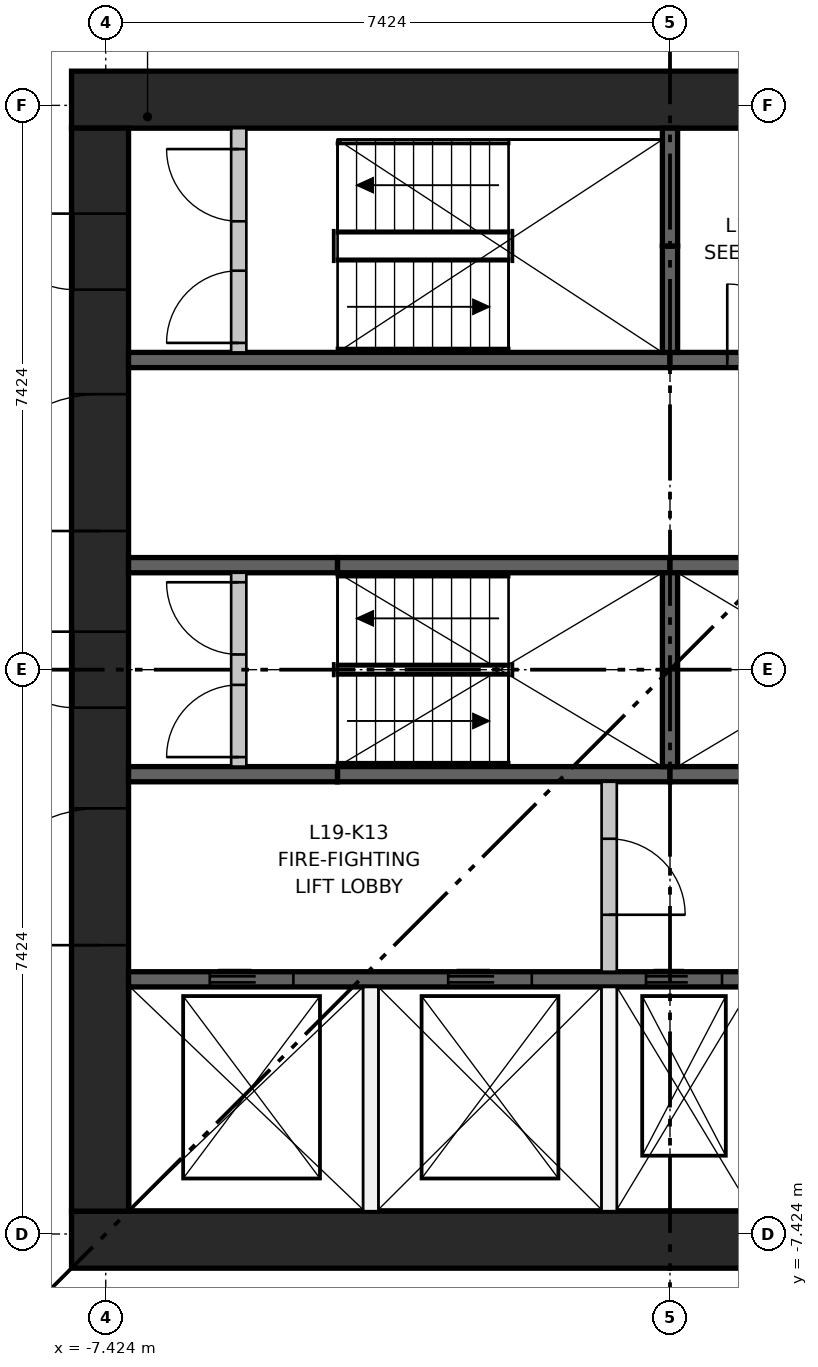
"""IFC4 building model, lengths in metres.
Left out: names, types, materials, properties, quantities, classifications, styles, units other than length and angle.
Written with IfcOpenShell. Run it as: python <this file> out.ifc"""

import sys

from ifc_helpers import new_model, si_unit, direction, frame, frame_2d, origin, place, context, subcontext, project, spatial, rectangle, extrude, element, fill, save


model = new_model("IFC4")
c1 = context("Model", 3, precision=1e-05, world=origin(), true_north=direction((0.0, 1.0)))
c2 = subcontext(c1, "Body", "Model", "MODEL_VIEW")
j1 = project(units=[si_unit("LENGTHUNIT", "METRE"), si_unit("PLANEANGLEUNIT", "RADIAN")], contexts=[c1])
p1 = place(None, origin())
s1 = spatial("IfcSite", under=j1, at=p1, CompositionType="ELEMENT")
p2 = place(p1, origin())
s2 = spatial("IfcBuilding", under=s1, at=p2, CompositionType="ELEMENT")
p3 = place(p2, frame((0.0, 0.0, 76.4)))
s3 = spatial("IfcBuildingStorey", under=s2, at=p3, CompositionType="ELEMENT", Elevation=76.4)
for number, where, z_axis, x_axis in (
    (1, (-7.874, -7.499, 0.0), (0.0, 0.0, 1.0), (1.0, 0.0, 0.0)),
    (2, (-7.874, 7.499, 0.0), (0.0, 0.0, 1.0), (1.0, 0.0, 0.0)),
):
    element("IfcWall", number, at=place(p3, frame(where, z_axis=z_axis, x_axis=x_axis)), inside=s3, PredefinedType="SHEAR", context=c2, shape_type="SweptSolid", body=[
        extrude(rectangle(XDim=15.748, YDim=0.75, at=frame_2d((7.874, 0.0))), origin(), (0.0, 0.0, 1.0), 3.65),
    ])
p4 = place(p3, frame((-7.499, -7.124, 0.0), z_axis=(0.0, 0.0, 1.0), x_axis=(0.0, 1.0, 0.0)))
e3 = element("IfcWall", 3, at=p4, inside=s3, PredefinedType="SHEAR", context=c2, shape_type="SweptSolid", body=[
    extrude(rectangle(XDim=14.248, YDim=0.75, at=frame_2d((7.124, 0.0))), origin(), (0.0, 0.0, 1.0), 3.65),
])
p5 = place(p4, frame((6.624, 0.0, 0.0)))
e4 = element("IfcOpeningElement", 4, at=p5, cuts=e3, PredefinedType="OPENING", context=c2, shape_type="SweptSolid", body=[
    extrude(rectangle(XDim=1.0, YDim=2.1, at=frame_2d((0.5, 1.05))), frame((0.0, 0.385, 0.0), z_axis=(0.0, -1.0, 0.0), x_axis=(1.0, 0.0, 0.0)), (0.0, 0.0, 1.0), 0.77),
])
p6 = place(p4, frame((3.5, 0.0, 0.0)))
e5 = element("IfcOpeningElement", 5, at=p6, cuts=e3, PredefinedType="OPENING", context=c2, shape_type="SweptSolid", body=[
    extrude(rectangle(XDim=1.8, YDim=2.1, at=frame_2d((0.9, 1.05))), frame((0.0, 0.385, 0.0), z_axis=(0.0, -1.0, 0.0), x_axis=(1.0, 0.0, 0.0)), (0.0, 0.0, 1.0), 0.77),
])
p7 = place(p4, frame((8.948, 0.0, 0.0)))
e6 = element("IfcOpeningElement", 6, at=p7, cuts=e3, PredefinedType="OPENING", context=c2, shape_type="SweptSolid", body=[
    extrude(rectangle(XDim=1.8, YDim=2.1, at=frame_2d((0.9, 1.05))), frame((0.0, 0.385, 0.0), z_axis=(0.0, -1.0, 0.0), x_axis=(1.0, 0.0, 0.0)), (0.0, 0.0, 1.0), 0.77),
])
p8 = place(p4, frame((12.124, 0.0, 0.0)))
e7 = element("IfcOpeningElement", 7, at=p8, cuts=e3, PredefinedType="OPENING", context=c2, shape_type="SweptSolid", body=[
    extrude(rectangle(XDim=1.0, YDim=2.1, at=frame_2d((0.5, 1.05))), frame((0.0, 0.385, 0.0), z_axis=(0.0, -1.0, 0.0), x_axis=(1.0, 0.0, 0.0)), (0.0, 0.0, 1.0), 0.77),
])
p9 = place(p3, frame((-7.124, -4.074, 0.0), z_axis=(0.0, 0.0, 1.0), x_axis=(1.0, 0.0, 0.0)))
e8 = element("IfcWall", 8, at=p9, inside=s3, PredefinedType="SHEAR", context=c2, shape_type="SweptSolid", body=[
    extrude(rectangle(XDim=14.248, YDim=0.2, at=frame_2d((7.124, 0.0))), origin(), (0.0, 0.0, 1.0), 3.3),
])
p10 = place(p9, frame((1.069, 0.0, 0.0)))
e9 = element("IfcOpeningElement", 9, at=p10, cuts=e8, PredefinedType="OPENING", context=c2, shape_type="SweptSolid", body=[
    extrude(rectangle(XDim=1.1, YDim=2.1, at=frame_2d((0.55, 1.05))), frame((0.0, 0.11, 0.0), z_axis=(0.0, -1.0, 0.0), x_axis=(1.0, 0.0, 0.0)), (0.0, 0.0, 1.0), 0.22),
])
p11 = place(p9, frame((4.206, 0.0, 0.0)))
e10 = element("IfcOpeningElement", 10, at=p11, cuts=e8, PredefinedType="OPENING", context=c2, shape_type="SweptSolid", body=[
    extrude(rectangle(XDim=1.1, YDim=2.1, at=frame_2d((0.55, 1.05))), frame((0.0, 0.11, 0.0), z_axis=(0.0, -1.0, 0.0), x_axis=(1.0, 0.0, 0.0)), (0.0, 0.0, 1.0), 0.22),
])
p12 = place(p9, frame((6.808, 0.0, 0.0)))
e11 = element("IfcOpeningElement", 11, at=p12, cuts=e8, PredefinedType="OPENING", context=c2, shape_type="SweptSolid", body=[
    extrude(rectangle(XDim=1.0, YDim=2.1, at=frame_2d((0.5, 1.05))), frame((0.0, 0.11, 0.0), z_axis=(0.0, -1.0, 0.0), x_axis=(1.0, 0.0, 0.0)), (0.0, 0.0, 1.0), 0.22),
])
p13 = place(p9, frame((8.777, 0.0, 0.0)))
e12 = element("IfcOpeningElement", 12, at=p13, cuts=e8, PredefinedType="OPENING", context=c2, shape_type="SweptSolid", body=[
    extrude(rectangle(XDim=1.0, YDim=2.1, at=frame_2d((0.5, 1.05))), frame((0.0, 0.11, 0.0), z_axis=(0.0, -1.0, 0.0), x_axis=(1.0, 0.0, 0.0)), (0.0, 0.0, 1.0), 0.22),
])
p14 = place(p9, frame((10.745, 0.0, 0.0)))
e13 = element("IfcOpeningElement", 13, at=p14, cuts=e8, PredefinedType="OPENING", context=c2, shape_type="SweptSolid", body=[
    extrude(rectangle(XDim=1.0, YDim=2.1, at=frame_2d((0.5, 1.05))), frame((0.0, 0.11, 0.0), z_axis=(0.0, -1.0, 0.0), x_axis=(1.0, 0.0, 0.0)), (0.0, 0.0, 1.0), 0.22),
])
p15 = place(p9, frame((12.714, 0.0, 0.0)))
e14 = element("IfcOpeningElement", 14, at=p15, cuts=e8, PredefinedType="OPENING", context=c2, shape_type="SweptSolid", body=[
    extrude(rectangle(XDim=1.0, YDim=2.1, at=frame_2d((0.5, 1.05))), frame((0.0, 0.11, 0.0), z_axis=(0.0, -1.0, 0.0), x_axis=(1.0, 0.0, 0.0)), (0.0, 0.0, 1.0), 0.22),
])
p16 = place(p3, frame((-7.124, 4.074, 0.0), z_axis=(0.0, 0.0, 1.0), x_axis=(1.0, 0.0, 0.0)))
e15 = element("IfcWall", 15, at=p16, inside=s3, PredefinedType="SHEAR", context=c2, shape_type="SweptSolid", body=[
    extrude(rectangle(XDim=7.124, YDim=0.2, at=frame_2d((3.562, 0.0))), origin(), (0.0, 0.0, 1.0), 3.3),
])
p17 = place(p3, frame((0.0, 4.074, 0.0), z_axis=(0.0, 0.0, 1.0), x_axis=(1.0, 0.0, 0.0)))
e16 = element("IfcWall", 16, at=p17, inside=s3, PredefinedType="SHEAR", context=c2, shape_type="SweptSolid", body=[
    extrude(rectangle(XDim=7.124, YDim=0.2, at=frame_2d((3.562, 0.0))), origin(), (0.0, 0.0, 1.0), 3.3),
])
p18 = place(p17, frame((0.753, 0.0, 0.0)))
e17 = element("IfcOpeningElement", 17, at=p18, cuts=e16, PredefinedType="OPENING", context=c2, shape_type="SweptSolid", body=[
    extrude(rectangle(XDim=1.0, YDim=2.1, at=frame_2d((0.5, 1.05))), frame((0.0, 0.11, 0.0), z_axis=(0.0, -1.0, 0.0), x_axis=(1.0, 0.0, 0.0)), (0.0, 0.0, 1.0), 0.22),
])
p19 = place(p17, frame((2.685, 0.0, 0.0)))
e18 = element("IfcOpeningElement", 18, at=p19, cuts=e16, PredefinedType="OPENING", context=c2, shape_type="SweptSolid", body=[
    extrude(rectangle(XDim=0.95, YDim=2.1, at=frame_2d((0.475, 1.05))), frame((0.0, 0.11, 0.0), z_axis=(0.0, -1.0, 0.0), x_axis=(1.0, 0.0, 0.0)), (0.0, 0.0, 1.0), 0.22),
])
p20 = place(p17, frame((4.06, 0.0, 0.0)))
e19 = element("IfcOpeningElement", 19, at=p20, cuts=e16, PredefinedType="OPENING", context=c2, shape_type="SweptSolid", body=[
    extrude(rectangle(XDim=1.0, YDim=2.1, at=frame_2d((0.5, 1.05))), frame((0.0, 0.11, 0.0), z_axis=(0.0, -1.0, 0.0), x_axis=(1.0, 0.0, 0.0)), (0.0, 0.0, 1.0), 0.22),
])
p21 = place(p17, frame((5.79, 0.0, 0.0)))
e20 = element("IfcOpeningElement", 20, at=p21, cuts=e16, PredefinedType="OPENING", context=c2, shape_type="SweptSolid", body=[
    extrude(rectangle(XDim=0.8, YDim=2.1, at=frame_2d((0.4, 1.05))), frame((0.0, 0.11, 0.0), z_axis=(0.0, -1.0, 0.0), x_axis=(1.0, 0.0, 0.0)), (0.0, 0.0, 1.0), 0.22),
])
p22 = place(p3, frame((-7.124, -1.375, 0.0), z_axis=(0.0, 0.0, 1.0), x_axis=(1.0, 0.0, 0.0)))
e21 = element("IfcWall", 21, at=p22, inside=s3, PredefinedType="SHEAR", context=c2, shape_type="SweptSolid", body=[
    extrude(rectangle(XDim=2.75, YDim=0.2, at=frame_2d((1.375, 0.0))), origin(), (0.0, 0.0, 1.0), 3.3),
])
for number, where, z_axis, x_axis in (
    (22, (-4.374, -1.375, 0.0), (0.0, 0.0, 1.0), (1.0, 0.0, 0.0)),
    (23, (0.0, -1.375, 0.0), (0.0, 0.0, 1.0), (1.0, 0.0, 0.0)),
):
    element("IfcWall", number, at=place(p3, frame(where, z_axis=z_axis, x_axis=x_axis)), inside=s3, PredefinedType="SHEAR", context=c2, shape_type="SweptSolid", body=[
        extrude(rectangle(XDim=4.374, YDim=0.2, at=frame_2d((2.187, 0.0))), origin(), (0.0, 0.0, 1.0), 3.3),
    ])
p23 = place(p3, frame((-7.124, 1.375, 0.0), z_axis=(0.0, 0.0, 1.0), x_axis=(1.0, 0.0, 0.0)))
e24 = element("IfcWall", 24, at=p23, inside=s3, PredefinedType="SHEAR", context=c2, shape_type="SweptSolid", body=[
    extrude(rectangle(XDim=2.75, YDim=0.2, at=frame_2d((1.375, 0.0))), origin(), (0.0, 0.0, 1.0), 3.3),
])
for number, where, z_axis, x_axis in (
    (25, (-4.374, 1.375, 0.0), (0.0, 0.0, 1.0), (1.0, 0.0, 0.0)),
    (26, (0.0, 1.375, 0.0), (0.0, 0.0, 1.0), (1.0, 0.0, 0.0)),
):
    element("IfcWall", number, at=place(p3, frame(where, z_axis=z_axis, x_axis=x_axis)), inside=s3, PredefinedType="SHEAR", context=c2, shape_type="SweptSolid", body=[
        extrude(rectangle(XDim=4.374, YDim=0.2, at=frame_2d((2.187, 0.0))), origin(), (0.0, 0.0, 1.0), 3.3),
    ])
p24 = place(p3, frame((0.0, -1.275, 0.0), z_axis=(0.0, 0.0, 1.0), x_axis=(0.0, 1.0, 0.0)))
e27 = element("IfcWall", 27, at=p24, inside=s3, PredefinedType="SHEAR", context=c2, shape_type="SweptSolid", body=[
    extrude(rectangle(XDim=2.55, YDim=0.2, at=frame_2d((1.275, 0.0))), origin(), (0.0, 0.0, 1.0), 3.3),
])
for number, where, z_axis, x_axis in (
    (28, (-3.937, -7.124, 0.0), (0.0, 0.0, 1.0), (0.0, 1.0, 0.0)),
    (29, (-0.8, -7.124, 0.0), (0.0, 0.0, 1.0), (0.0, 1.0, 0.0)),
):
    element("IfcWall", number, at=place(p3, frame(where, z_axis=z_axis, x_axis=x_axis)), inside=s3, PredefinedType="PARTITIONING", context=c2, shape_type="SweptSolid", body=[
        extrude(rectangle(XDim=2.95, YDim=0.2, at=frame_2d((1.475, 0.0))), origin(), (0.0, 0.0, 1.0), 3.3),
    ])
p25 = place(p3, frame((-0.8, -3.974, 0.0), z_axis=(0.0, 0.0, 1.0), x_axis=(0.0, 1.0, 0.0)))
e30 = element("IfcWall", 30, at=p25, inside=s3, PredefinedType="PARTITIONING", context=c2, shape_type="SweptSolid", body=[
    extrude(rectangle(XDim=2.499, YDim=0.2, at=frame_2d((1.25, 0.0))), origin(), (0.0, 0.0, 1.0), 3.3),
])
p26 = place(p25, frame((0.75, 0.0, 0.0)))
e31 = element("IfcOpeningElement", 31, at=p26, cuts=e30, PredefinedType="OPENING", context=c2, shape_type="SweptSolid", body=[
    extrude(rectangle(XDim=1.0, YDim=2.1, at=frame_2d((0.5, 1.05))), frame((0.0, 0.11, 0.0), z_axis=(0.0, -1.0, 0.0), x_axis=(1.0, 0.0, 0.0)), (0.0, 0.0, 1.0), 0.22),
])
p27 = place(p3, frame((0.0, 4.174, 0.0), z_axis=(0.0, 0.0, 1.0), x_axis=(0.0, 1.0, 0.0)))
e32 = element("IfcWall", 32, at=p27, inside=s3, PredefinedType="SHEAR", context=c2, shape_type="SweptSolid", body=[
    extrude(rectangle(XDim=1.4, YDim=0.2, at=frame_2d((0.7, 0.0))), origin(), (0.0, 0.0, 1.0), 3.3),
])
p28 = place(p3, frame((0.0, 5.574, 0.0), z_axis=(0.0, 0.0, 1.0), x_axis=(0.0, 1.0, 0.0)))
e33 = element("IfcWall", 33, at=p28, inside=s3, PredefinedType="SHEAR", context=c2, shape_type="SweptSolid", body=[
    extrude(rectangle(XDim=1.55, YDim=0.2, at=frame_2d((0.775, 0.0))), origin(), (0.0, 0.0, 1.0), 3.3),
])
p29 = place(p3, frame((-5.674, -1.275, 0.0), z_axis=(0.0, 0.0, 1.0), x_axis=(0.0, 1.0, 0.0)))
e34 = element("IfcWall", 34, at=p29, inside=s3, PredefinedType="PARTITIONING", context=c2, shape_type="SweptSolid", body=[
    extrude(rectangle(XDim=2.55, YDim=0.2, at=frame_2d((1.275, 0.0))), origin(), (0.0, 0.0, 1.0), 3.3),
])
p30 = place(p29, frame((0.125, 0.0, 0.0)))
e35 = element("IfcOpeningElement", 35, at=p30, cuts=e34, PredefinedType="OPENING", context=c2, shape_type="SweptSolid", body=[
    extrude(rectangle(XDim=0.95, YDim=2.1, at=frame_2d((0.475, 1.05))), frame((0.0, 0.11, 0.0), z_axis=(0.0, -1.0, 0.0), x_axis=(1.0, 0.0, 0.0)), (0.0, 0.0, 1.0), 0.22),
])
p31 = place(p29, frame((1.475, 0.0, 0.0)))
e36 = element("IfcOpeningElement", 36, at=p31, cuts=e34, PredefinedType="OPENING", context=c2, shape_type="SweptSolid", body=[
    extrude(rectangle(XDim=0.95, YDim=2.1, at=frame_2d((0.475, 1.05))), frame((0.0, 0.11, 0.0), z_axis=(0.0, -1.0, 0.0), x_axis=(1.0, 0.0, 0.0)), (0.0, 0.0, 1.0), 0.22),
])
p32 = place(p3, frame((-5.674, 4.174, 0.0), z_axis=(0.0, 0.0, 1.0), x_axis=(0.0, 1.0, 0.0)))
e37 = element("IfcWall", 37, at=p32, inside=s3, PredefinedType="PARTITIONING", context=c2, shape_type="SweptSolid", body=[
    extrude(rectangle(XDim=2.95, YDim=0.2, at=frame_2d((1.475, 0.0))), origin(), (0.0, 0.0, 1.0), 3.3),
])
p33 = place(p32, frame((0.125, 0.0, 0.0)))
e38 = element("IfcOpeningElement", 38, at=p33, cuts=e37, PredefinedType="OPENING", context=c2, shape_type="SweptSolid", body=[
    extrude(rectangle(XDim=0.95, YDim=2.1, at=frame_2d((0.475, 1.05))), frame((0.0, 0.11, 0.0), z_axis=(0.0, -1.0, 0.0), x_axis=(1.0, 0.0, 0.0)), (0.0, 0.0, 1.0), 0.22),
])
p34 = place(p32, frame((1.725, 0.0, 0.0)))
e39 = element("IfcOpeningElement", 39, at=p34, cuts=e37, PredefinedType="OPENING", context=c2, shape_type="SweptSolid", body=[
    extrude(rectangle(XDim=0.95, YDim=2.1, at=frame_2d((0.475, 1.05))), frame((0.0, 0.11, 0.0), z_axis=(0.0, -1.0, 0.0), x_axis=(1.0, 0.0, 0.0)), (0.0, 0.0, 1.0), 0.22),
])
p35 = place(p10, origin())
e40 = element("IfcDoor", 40, at=p35, inside=s3, OperationType="DOUBLE_DOOR_SLIDING", PredefinedType="DOOR", context=c2, shape_type="SweptSolid", body=[
    extrude(rectangle(XDim=1.1, YDim=2.1, at=frame_2d((0.55, 1.05))), frame((0.0, 0.025, 0.0), z_axis=(0.0, -1.0, 0.0), x_axis=(1.0, 0.0, 0.0)), (0.0, 0.0, 1.0), 0.05),
])
fill(e9, e40)
p36 = place(p11, origin())
e41 = element("IfcDoor", 41, at=p36, inside=s3, OperationType="DOUBLE_DOOR_SLIDING", PredefinedType="DOOR", context=c2, shape_type="SweptSolid", body=[
    extrude(rectangle(XDim=1.1, YDim=2.1, at=frame_2d((0.55, 1.05))), frame((0.0, 0.025, 0.0), z_axis=(0.0, -1.0, 0.0), x_axis=(1.0, 0.0, 0.0)), (0.0, 0.0, 1.0), 0.05),
])
fill(e10, e41)
p37 = place(p12, origin())
e42 = element("IfcDoor", 42, at=p37, inside=s3, OperationType="DOUBLE_DOOR_SLIDING", PredefinedType="DOOR", context=c2, shape_type="SweptSolid", body=[
    extrude(rectangle(XDim=1.0, YDim=2.1, at=frame_2d((0.5, 1.05))), frame((0.0, 0.025, 0.0), z_axis=(0.0, -1.0, 0.0), x_axis=(1.0, 0.0, 0.0)), (0.0, 0.0, 1.0), 0.05),
])
fill(e11, e42)
p38 = place(p30, origin())
e43 = element("IfcDoor", 43, at=p38, inside=s3, OperationType="SINGLE_SWING_LEFT", PredefinedType="DOOR", context=c2, shape_type="SweptSolid", body=[
    extrude(rectangle(XDim=0.95, YDim=2.1, at=frame_2d((0.475, 1.05))), frame((0.0, 0.025, 0.0), z_axis=(0.0, -1.0, 0.0), x_axis=(1.0, 0.0, 0.0)), (0.0, 0.0, 1.0), 0.05),
])
fill(e35, e43)
p39 = place(p31, origin())
e44 = element("IfcDoor", 44, at=p39, inside=s3, OperationType="SINGLE_SWING_RIGHT", PredefinedType="DOOR", context=c2, shape_type="SweptSolid", body=[
    extrude(rectangle(XDim=0.95, YDim=2.1, at=frame_2d((0.475, 1.05))), frame((0.0, 0.025, 0.0), z_axis=(0.0, -1.0, 0.0), x_axis=(1.0, 0.0, 0.0)), (0.0, 0.0, 1.0), 0.05),
])
fill(e36, e44)
p40 = place(p33, origin())
e45 = element("IfcDoor", 45, at=p40, inside=s3, OperationType="SINGLE_SWING_LEFT", PredefinedType="DOOR", context=c2, shape_type="SweptSolid", body=[
    extrude(rectangle(XDim=0.95, YDim=2.1, at=frame_2d((0.475, 1.05))), frame((0.0, 0.025, 0.0), z_axis=(0.0, -1.0, 0.0), x_axis=(1.0, 0.0, 0.0)), (0.0, 0.0, 1.0), 0.05),
])
fill(e38, e45)
p41 = place(p34, origin())
e46 = element("IfcDoor", 46, at=p41, inside=s3, OperationType="SINGLE_SWING_RIGHT", PredefinedType="DOOR", context=c2, shape_type="SweptSolid", body=[
    extrude(rectangle(XDim=0.95, YDim=2.1, at=frame_2d((0.475, 1.05))), frame((0.0, 0.025, 0.0), z_axis=(0.0, -1.0, 0.0), x_axis=(1.0, 0.0, 0.0)), (0.0, 0.0, 1.0), 0.05),
])
fill(e39, e46)
p42 = place(p26, frame((1.0, 0.0, 0.0), z_axis=(0.0, 0.0, 1.0), x_axis=(-1.0, 0.0, 0.0)))
e47 = element("IfcDoor", 47, at=p42, inside=s3, OperationType="SINGLE_SWING_LEFT", PredefinedType="DOOR", context=c2, shape_type="SweptSolid", body=[
    extrude(rectangle(XDim=1.0, YDim=2.1, at=frame_2d((0.5, 1.05))), frame((0.0, 0.025, 0.0), z_axis=(0.0, -1.0, 0.0), x_axis=(1.0, 0.0, 0.0)), (0.0, 0.0, 1.0), 0.05),
])
fill(e31, e47)
p43 = place(p18, origin())
e48 = element("IfcDoor", 48, at=p43, inside=s3, OperationType="SINGLE_SWING_LEFT", PredefinedType="DOOR", context=c2, shape_type="SweptSolid", body=[
    extrude(rectangle(XDim=1.0, YDim=2.1, at=frame_2d((0.5, 1.05))), frame((0.0, 0.025, 0.0), z_axis=(0.0, -1.0, 0.0), x_axis=(1.0, 0.0, 0.0)), (0.0, 0.0, 1.0), 0.05),
])
fill(e17, e48)
p44 = place(p5, origin())
e49 = element("IfcDoor", 49, at=p44, inside=s3, OperationType="SINGLE_SWING_RIGHT", PredefinedType="DOOR", context=c2, shape_type="SweptSolid", body=[
    extrude(rectangle(XDim=1.0, YDim=2.1, at=frame_2d((0.5, 1.05))), frame((0.0, 0.375, 0.0), z_axis=(0.0, -1.0, 0.0), x_axis=(1.0, 0.0, 0.0)), (0.0, 0.0, 1.0), 0.05),
])
fill(e4, e49)
p45 = place(p6, origin())
e50 = element("IfcDoor", 50, at=p45, inside=s3, OperationType="DOUBLE_DOOR_SINGLE_SWING", PredefinedType="DOOR", context=c2, shape_type="SweptSolid", body=[
    extrude(rectangle(XDim=1.8, YDim=2.1, at=frame_2d((0.9, 1.05))), frame((0.0, 0.025, 0.0), z_axis=(0.0, -1.0, 0.0), x_axis=(1.0, 0.0, 0.0)), (0.0, 0.0, 1.0), 0.05),
])
fill(e5, e50)
p46 = place(p7, origin())
e51 = element("IfcDoor", 51, at=p46, inside=s3, OperationType="DOUBLE_DOOR_SINGLE_SWING", PredefinedType="DOOR", context=c2, shape_type="SweptSolid", body=[
    extrude(rectangle(XDim=1.8, YDim=2.1, at=frame_2d((0.9, 1.05))), frame((0.0, 0.025, 0.0), z_axis=(0.0, -1.0, 0.0), x_axis=(1.0, 0.0, 0.0)), (0.0, 0.0, 1.0), 0.05),
])
fill(e6, e51)
p47 = place(p8, origin())
e52 = element("IfcDoor", 52, at=p47, inside=s3, OperationType="SINGLE_SWING_RIGHT", PredefinedType="DOOR", context=c2, shape_type="SweptSolid", body=[
    extrude(rectangle(XDim=1.0, YDim=2.1, at=frame_2d((0.5, 1.05))), frame((0.0, 0.375, 0.0), z_axis=(0.0, -1.0, 0.0), x_axis=(1.0, 0.0, 0.0)), (0.0, 0.0, 1.0), 0.05),
])
fill(e7, e52)
save(model, sys.argv[1])
